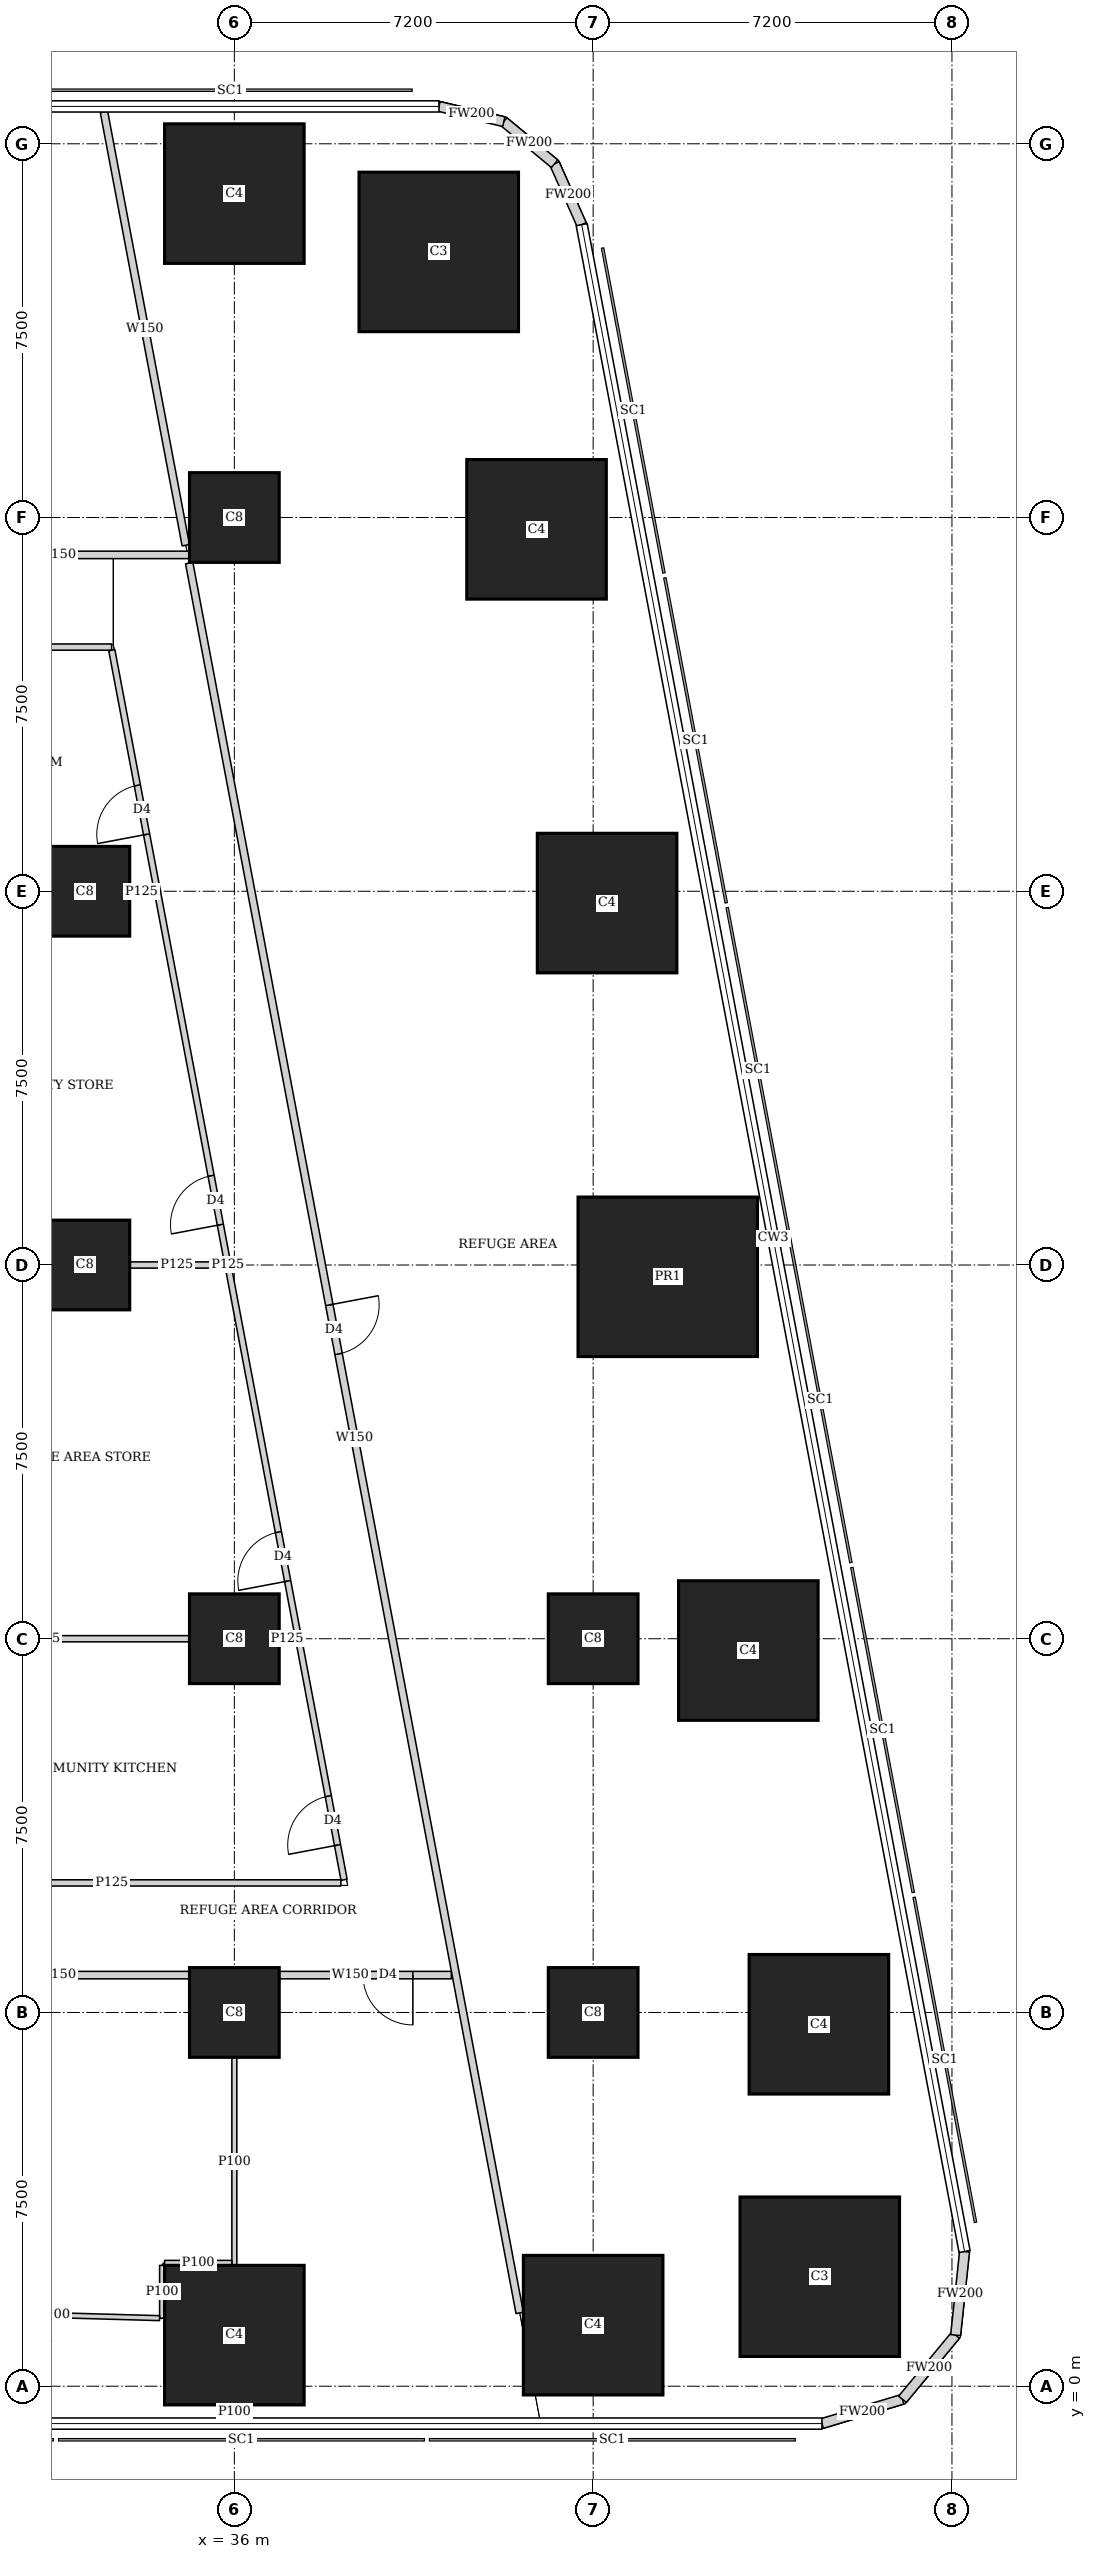
"""IFC4 building model, lengths in metres.
Left out: names, types, materials, properties, quantities, classifications, styles, units other than length and angle.
Written with IfcOpenShell. Run it as: python <this file> out.ifc"""

import sys

from ifc_helpers import new_model, si_unit, direction, frame, frame_2d, origin, origin_2d, place, context, subcontext, project, spatial, rectangle, extrude, element, fill, save


model = new_model("IFC4")
c1 = context("Model", 3, precision=1e-05, world=origin(), true_north=direction((0.0, 1.0)))
c2 = subcontext(c1, "Body", "Model", "MODEL_VIEW")
j1 = project(units=[si_unit("LENGTHUNIT", "METRE"), si_unit("PLANEANGLEUNIT", "RADIAN")], contexts=[c1])
p1 = place(None, origin())
s1 = spatial("IfcSite", under=j1, at=p1, CompositionType="ELEMENT")
p2 = place(p1, origin())
s2 = spatial("IfcBuilding", under=s1, at=p2, CompositionType="ELEMENT")
p3 = place(p2, frame((0.0, 0.0, 72.5)))
s3 = spatial("IfcBuildingStorey", under=s2, at=p3, CompositionType="ELEMENT", Elevation=72.5)
for number, where, z_axis, x_axis in (
    (1, (36.0, 1.025, 0.0), (0.0, 0.0, 1.0), (1.0, 0.0, 0.0)),
    (2, (43.2, 1.225, 0.0), (0.0, 0.0, 1.0), (1.0, 0.0, 0.0)),
):
    element("IfcColumn", number, at=place(p3, frame(where, z_axis=z_axis, x_axis=x_axis)), inside=s3, PredefinedType="COLUMN", context=c2, shape_type="SweptSolid", body=[
        extrude(rectangle(XDim=2.8, YDim=2.8, at=origin_2d()), origin(), (0.0, 0.0, 1.0), 5.4),
    ])
p4 = place(p3, frame((47.748, 2.197, 0.0), z_axis=(0.0, 0.0, 1.0), x_axis=(1.0, 0.0, 0.0)))
e3 = element("IfcColumn", 3, at=p4, inside=s3, PredefinedType="COLUMN", context=c2, shape_type="SweptSolid", body=[
    extrude(rectangle(XDim=3.2, YDim=3.2, at=origin_2d()), origin(), (0.0, 0.0, 1.0), 5.4),
])
for number, where, z_axis, x_axis in (
    (4, (36.0, 7.5, 0.0), (0.0, 0.0, 1.0), (1.0, 0.0, 0.0)),
    (5, (43.2, 7.5, 0.0), (0.0, 0.0, 1.0), (1.0, 0.0, 0.0)),
):
    element("IfcColumn", number, at=place(p3, frame(where, z_axis=z_axis, x_axis=x_axis)), inside=s3, PredefinedType="COLUMN", context=c2, shape_type="SweptSolid", body=[
        extrude(rectangle(XDim=1.8, YDim=1.8, at=origin_2d()), origin(), (0.0, 0.0, 1.0), 5.4),
    ])
p5 = place(p3, frame((47.73, 7.263, 0.0), z_axis=(0.0, 0.0, 1.0), x_axis=(1.0, 0.0, 0.0)))
e6 = element("IfcColumn", 6, at=p5, inside=s3, PredefinedType="COLUMN", context=c2, shape_type="SweptSolid", body=[
    extrude(rectangle(XDim=2.8, YDim=2.8, at=origin_2d()), origin(), (0.0, 0.0, 1.0), 5.4),
])
for number, where, z_axis, x_axis in (
    (7, (36.0, 15.0, 0.0), (0.0, 0.0, 1.0), (1.0, 0.0, 0.0)),
    (8, (43.2, 15.0, 0.0), (0.0, 0.0, 1.0), (1.0, 0.0, 0.0)),
):
    element("IfcColumn", number, at=place(p3, frame(where, z_axis=z_axis, x_axis=x_axis)), inside=s3, PredefinedType="COLUMN", context=c2, shape_type="SweptSolid", body=[
        extrude(rectangle(XDim=1.8, YDim=1.8, at=origin_2d()), origin(), (0.0, 0.0, 1.0), 5.4),
    ])
p6 = place(p3, frame((46.314, 14.763, 0.0), z_axis=(0.0, 0.0, 1.0), x_axis=(1.0, 0.0, 0.0)))
e9 = element("IfcColumn", 9, at=p6, inside=s3, PredefinedType="COLUMN", context=c2, shape_type="SweptSolid", body=[
    extrude(rectangle(XDim=2.8, YDim=2.8, at=origin_2d()), origin(), (0.0, 0.0, 1.0), 5.4),
])
p7 = place(p3, frame((33.0, 22.5, 0.0), z_axis=(0.0, 0.0, 1.0), x_axis=(1.0, 0.0, 0.0)))
e10 = element("IfcColumn", 10, at=p7, inside=s3, PredefinedType="COLUMN", context=c2, shape_type="SweptSolid", body=[
    extrude(rectangle(XDim=1.8, YDim=1.8, at=origin_2d()), origin(), (0.0, 0.0, 1.0), 5.4),
])
p8 = place(p3, frame((44.697, 22.263, 0.0), z_axis=(0.0, 0.0, 1.0), x_axis=(1.0, 0.0, 0.0)))
e11 = element("IfcColumn", 11, at=p8, inside=s3, PredefinedType="COLUMN", context=c2, shape_type="SweptSolid", body=[
    extrude(rectangle(XDim=3.6, YDim=3.2, at=origin_2d()), origin(), (0.0, 0.0, 1.0), 5.4),
])
p9 = place(p3, frame((33.0, 30.0, 0.0), z_axis=(0.0, 0.0, 1.0), x_axis=(1.0, 0.0, 0.0)))
e12 = element("IfcColumn", 12, at=p9, inside=s3, PredefinedType="COLUMN", context=c2, shape_type="SweptSolid", body=[
    extrude(rectangle(XDim=1.8, YDim=1.8, at=origin_2d()), origin(), (0.0, 0.0, 1.0), 5.4),
])
p10 = place(p3, frame((43.48, 29.763, 0.0), z_axis=(0.0, 0.0, 1.0), x_axis=(1.0, 0.0, 0.0)))
e13 = element("IfcColumn", 13, at=p10, inside=s3, PredefinedType="COLUMN", context=c2, shape_type="SweptSolid", body=[
    extrude(rectangle(XDim=2.8, YDim=2.8, at=origin_2d()), origin(), (0.0, 0.0, 1.0), 5.4),
])
p11 = place(p3, frame((36.0, 37.5, 0.0), z_axis=(0.0, 0.0, 1.0), x_axis=(1.0, 0.0, 0.0)))
e14 = element("IfcColumn", 14, at=p11, inside=s3, PredefinedType="COLUMN", context=c2, shape_type="SweptSolid", body=[
    extrude(rectangle(XDim=1.8, YDim=1.8, at=origin_2d()), origin(), (0.0, 0.0, 1.0), 5.4),
])
p12 = place(p3, frame((42.064, 37.263, 0.0), z_axis=(0.0, 0.0, 1.0), x_axis=(1.0, 0.0, 0.0)))
e15 = element("IfcColumn", 15, at=p12, inside=s3, PredefinedType="COLUMN", context=c2, shape_type="SweptSolid", body=[
    extrude(rectangle(XDim=2.8, YDim=2.8, at=origin_2d()), origin(), (0.0, 0.0, 1.0), 5.4),
])
p13 = place(p3, frame((40.102, 42.83, 0.0), z_axis=(0.0, 0.0, 1.0), x_axis=(1.0, 0.0, 0.0)))
e16 = element("IfcColumn", 16, at=p13, inside=s3, PredefinedType="COLUMN", context=c2, shape_type="SweptSolid", body=[
    extrude(rectangle(XDim=3.2, YDim=3.2, at=origin_2d()), origin(), (0.0, 0.0, 1.0), 5.4),
])
p14 = place(p3, frame((36.0, 44.0, 0.0), z_axis=(0.0, 0.0, 1.0), x_axis=(1.0, 0.0, 0.0)))
e17 = element("IfcColumn", 17, at=p14, inside=s3, PredefinedType="COLUMN", context=c2, shape_type="SweptSolid", body=[
    extrude(rectangle(XDim=2.8, YDim=2.8, at=origin_2d()), origin(), (0.0, 0.0, 1.0), 5.4),
])
p15 = place(p3, frame((47.791, -0.75, 0.0), z_axis=(0.0, 0.0, 1.0), x_axis=(0.957455232626, 0.288581838509, 0.0)))
e18 = element("IfcWall", 18, at=p15, inside=s3, PredefinedType="SOLIDWALL", context=c2, shape_type="SweptSolid", body=[
    extrude(rectangle(XDim=1.688, YDim=0.2, at=frame_2d((0.844, 0.0))), origin(), (0.0, 0.0, 1.0), 5.15),
])
p16 = place(p3, frame((49.407, -0.263, 0.0), z_axis=(0.0, 0.0, 1.0), x_axis=(0.638042593423, 0.770001070764, 0.0)))
e19 = element("IfcWall", 19, at=p16, inside=s3, PredefinedType="SOLIDWALL", context=c2, shape_type="SweptSolid", body=[
    extrude(rectangle(XDim=1.673, YDim=0.2, at=frame_2d((0.836, 0.0))), origin(), (0.0, 0.0, 1.0), 5.15),
])
p17 = place(p3, frame((50.474, 1.025, 0.0), z_axis=(0.0, 0.0, 1.0), x_axis=(0.106047815515, 0.994361031429, 0.0)))
e20 = element("IfcWall", 20, at=p17, inside=s3, PredefinedType="SOLIDWALL", context=c2, shape_type="SweptSolid", body=[
    extrude(rectangle(XDim=1.688, YDim=0.2, at=frame_2d((0.844, 0.0))), origin(), (0.0, 0.0, 1.0), 5.15),
])
p18 = place(p3, frame((42.97, 43.377, 0.0), z_axis=(0.0, 0.0, 1.0), x_axis=(-0.406002956633, 0.913871762998, 0.0)))
e21 = element("IfcWall", 21, at=p18, inside=s3, PredefinedType="SOLIDWALL", context=c2, shape_type="SweptSolid", body=[
    extrude(rectangle(XDim=1.337, YDim=0.2, at=frame_2d((0.669, 0.0))), origin(), (0.0, 0.0, 1.0), 5.15),
])
p19 = place(p3, frame((42.427, 44.599, 0.0), z_axis=(0.0, 0.0, 1.0), x_axis=(-0.770091412544, 0.637933551655, 0.0)))
e22 = element("IfcWall", 22, at=p19, inside=s3, PredefinedType="SOLIDWALL", context=c2, shape_type="SweptSolid", body=[
    extrude(rectangle(XDim=1.324, YDim=0.2, at=frame_2d((0.662, 0.0))), origin(), (0.0, 0.0, 1.0), 5.15),
])
p20 = place(p3, frame((41.407, 45.444, 0.0), z_axis=(0.0, 0.0, 1.0), x_axis=(-0.973453091607, 0.228886606077, 0.0)))
e23 = element("IfcWall", 23, at=p20, inside=s3, PredefinedType="SOLIDWALL", context=c2, shape_type="SweptSolid", body=[
    extrude(rectangle(XDim=1.336, YDim=0.2, at=frame_2d((0.668, 0.0))), origin(), (0.0, 0.0, 1.0), 5.15),
])
p21 = place(p3, frame((40.355, 8.25, 0.0), z_axis=(0.0, 0.0, 1.0), x_axis=(-1.0, 0.0, 0.0)))
e24 = element("IfcWall", 24, at=p21, inside=s3, PredefinedType="SOLIDWALL", context=c2, shape_type="SweptSolid", body=[
    extrude(rectangle(XDim=3.454, YDim=0.15, at=frame_2d((1.727, 0.0))), origin(), (0.0, 0.0, 1.0), 3.55),
])
p22 = place(p21, frame((0.773, 0.0, 0.0)))
e25 = element("IfcOpeningElement", 25, at=p22, cuts=e24, PredefinedType="OPENING", context=c2, shape_type="SweptSolid", body=[
    extrude(rectangle(XDim=1.0, YDim=2.1, at=frame_2d((0.5, 1.05))), frame((0.0, 0.085, 0.0), z_axis=(0.0, -1.0, 0.0), x_axis=(1.0, 0.0, 0.0)), (0.0, 0.0, 1.0), 0.17),
])
p23 = place(p3, frame((35.099, 8.25, 0.0), z_axis=(0.0, 0.0, 1.0), x_axis=(-1.0, 0.0, 0.0)))
e26 = element("IfcWall", 26, at=p23, inside=s3, PredefinedType="SOLIDWALL", context=c2, shape_type="SweptSolid", body=[
    extrude(rectangle(XDim=5.298, YDim=0.15, at=frame_2d((2.649, 0.0))), origin(), (0.0, 0.0, 1.0), 3.15),
])
p24 = place(p23, frame((3.148, 0.0, 0.0)))
e27 = element("IfcOpeningElement", 27, at=p24, cuts=e26, PredefinedType="OPENING", context=c2, shape_type="SweptSolid", body=[
    extrude(rectangle(XDim=2.0, YDim=2.1, at=frame_2d((1.0, 1.05))), frame((0.0, 0.085, 0.0), z_axis=(0.0, -1.0, 0.0), x_axis=(1.0, 0.0, 0.0)), (0.0, 0.0, 1.0), 0.17),
])
p25 = place(p3, frame((29.801, 36.75, 0.0), z_axis=(0.0, 0.0, 1.0), x_axis=(1.0, 0.0, 0.0)))
e28 = element("IfcWall", 28, at=p25, inside=s3, PredefinedType="SOLIDWALL", context=c2, shape_type="SweptSolid", body=[
    extrude(rectangle(XDim=5.299, YDim=0.15, at=frame_2d((2.649, 0.0))), origin(), (0.0, 0.0, 1.0), 3.15),
])
p26 = place(p3, frame((33.384, 45.638, 0.0), z_axis=(0.0, 0.0, 1.0), x_axis=(0.18557124981, -0.982630811263, 0.0)))
e29 = element("IfcWall", 29, at=p26, inside=s3, PredefinedType="SOLIDWALL", context=c2, shape_type="SweptSolid", body=[
    extrude(rectangle(XDim=8.847, YDim=0.15, at=frame_2d((4.424, 0.0))), origin(), (0.0, 0.0, 1.0), 3.35),
])
p27 = place(p3, frame((35.094, 36.585, 0.0), z_axis=(0.0, 0.0, 1.0), x_axis=(0.185591455861, -0.982626995106, 0.0)))
e30 = element("IfcWall", 30, at=p27, inside=s3, PredefinedType="SOLIDWALL", context=c2, shape_type="SweptSolid", body=[
    extrude(rectangle(XDim=35.735, YDim=0.15, at=frame_2d((17.867, 0.0))), origin(), (0.0, 0.0, 1.0), 3.35),
])
p28 = place(p27, frame((15.15, 0.0, 0.0)))
e31 = element("IfcOpeningElement", 31, at=p28, cuts=e30, PredefinedType="OPENING", context=c2, shape_type="SweptSolid", body=[
    extrude(rectangle(XDim=1.0, YDim=2.1, at=frame_2d((0.5, 1.05))), frame((0.0, 0.085, 0.0), z_axis=(0.0, -1.0, 0.0), x_axis=(1.0, 0.0, 0.0)), (0.0, 0.0, 1.0), 0.17),
])
p29 = place(p3, frame((36.0, -0.637, 0.0), z_axis=(0.0, 0.0, 1.0), x_axis=(0.0, 1.0, 0.0)))
e32 = element("IfcWall", 32, at=p29, inside=s3, PredefinedType="PARTITIONING", context=c2, shape_type="SweptSolid", body=[
    extrude(rectangle(XDim=0.261, YDim=0.1, at=frame_2d((0.13, 0.0))), origin(), (0.0, 0.0, 1.0), 5.15),
])
p30 = place(p3, frame((36.0, 2.426, 0.0), z_axis=(0.0, 0.0, 1.0), x_axis=(0.0, 1.0, 0.0)))
e33 = element("IfcWall", 33, at=p30, inside=s3, PredefinedType="PARTITIONING", context=c2, shape_type="SweptSolid", body=[
    extrude(rectangle(XDim=4.173, YDim=0.1, at=frame_2d((2.086, 0.0))), origin(), (0.0, 0.0, 1.0), 3.55),
])
p31 = place(p3, frame((28.95, 10.1, 0.0), z_axis=(0.0, 0.0, 1.0), x_axis=(1.0, 0.0, 0.0)))
e34 = element("IfcWall", 34, at=p31, inside=s3, PredefinedType="PARTITIONING", context=c2, shape_type="SweptSolid", body=[
    extrude(rectangle(XDim=9.188, YDim=0.125, at=frame_2d((4.594, 0.0))), origin(), (0.0, 0.0, 1.0), 3.15),
])
p32 = place(p3, frame((28.95, 34.9, 0.0), z_axis=(0.0, 0.0, 1.0), x_axis=(1.0, 0.0, 0.0)))
e35 = element("IfcWall", 35, at=p32, inside=s3, PredefinedType="PARTITIONING", context=c2, shape_type="SweptSolid", body=[
    extrude(rectangle(XDim=4.588, YDim=0.125, at=frame_2d((2.294, 0.0))), origin(), (0.0, 0.0, 1.0), 3.15),
])
p33 = place(p3, frame((38.202, 10.163, 0.0), z_axis=(0.0, 0.0, 1.0), x_axis=(-0.185610321132, 0.982623431783, 0.0)))
e36 = element("IfcWall", 36, at=p33, inside=s3, PredefinedType="PARTITIONING", context=c2, shape_type="SweptSolid", body=[
    extrude(rectangle(XDim=25.111, YDim=0.125, at=frame_2d((12.556, 0.0))), origin(), (0.0, 0.0, 1.0), 3.55),
])
p34 = place(p33, frame((0.708, 0.0, 0.0)))
e37 = element("IfcOpeningElement", 37, at=p34, cuts=e36, PredefinedType="OPENING", context=c2, shape_type="SweptSolid", body=[
    extrude(rectangle(XDim=1.0, YDim=2.1, at=frame_2d((0.5, 1.05))), frame((0.0, 0.073, 0.0), z_axis=(0.0, -1.0, 0.0), x_axis=(1.0, 0.0, 0.0)), (0.0, 0.0, 1.0), 0.145),
])
p35 = place(p33, frame((6.1, 0.0, 0.0)))
e38 = element("IfcOpeningElement", 38, at=p35, cuts=e36, PredefinedType="OPENING", context=c2, shape_type="SweptSolid", body=[
    extrude(rectangle(XDim=1.0, YDim=2.1, at=frame_2d((0.5, 1.05))), frame((0.0, 0.073, 0.0), z_axis=(0.0, -1.0, 0.0), x_axis=(1.0, 0.0, 0.0)), (0.0, 0.0, 1.0), 0.145),
])
p36 = place(p33, frame((13.378, 0.0, 0.0)))
e39 = element("IfcOpeningElement", 39, at=p36, cuts=e36, PredefinedType="OPENING", context=c2, shape_type="SweptSolid", body=[
    extrude(rectangle(XDim=1.0, YDim=2.1, at=frame_2d((0.5, 1.05))), frame((0.0, 0.073, 0.0), z_axis=(0.0, -1.0, 0.0), x_axis=(1.0, 0.0, 0.0)), (0.0, 0.0, 1.0), 0.145),
])
p37 = place(p33, frame((21.35, 0.0, 0.0)))
e40 = element("IfcOpeningElement", 40, at=p37, cuts=e36, PredefinedType="OPENING", context=c2, shape_type="SweptSolid", body=[
    extrude(rectangle(XDim=1.0, YDim=2.1, at=frame_2d((0.5, 1.05))), frame((0.0, 0.073, 0.0), z_axis=(0.0, -1.0, 0.0), x_axis=(1.0, 0.0, 0.0)), (0.0, 0.0, 1.0), 0.145),
])
p38 = place(p3, frame((29.25, 15.0, 0.0), z_axis=(0.0, 0.0, 1.0), x_axis=(1.0, 0.0, 0.0)))
e41 = element("IfcWall", 41, at=p38, inside=s3, PredefinedType="PARTITIONING", context=c2, shape_type="SweptSolid", body=[
    extrude(rectangle(XDim=5.849, YDim=0.125, at=frame_2d((2.925, 0.0))), origin(), (0.0, 0.0, 1.0), 3.55),
])
p39 = place(p3, frame((36.901, 15.0, 0.0), z_axis=(0.0, 0.0, 1.0), x_axis=(1.0, 0.0, 0.0)))
e42 = element("IfcWall", 42, at=p39, inside=s3, PredefinedType="PARTITIONING", context=c2, shape_type="SweptSolid", body=[
    extrude(rectangle(XDim=0.312, YDim=0.125, at=frame_2d((0.156, 0.0))), origin(), (0.0, 0.0, 1.0), 3.55),
])
p40 = place(p3, frame((33.901, 22.5, 0.0), z_axis=(0.0, 0.0, 1.0), x_axis=(1.0, 0.0, 0.0)))
e43 = element("IfcWall", 43, at=p40, inside=s3, PredefinedType="PARTITIONING", context=c2, shape_type="SweptSolid", body=[
    extrude(rectangle(XDim=1.895, YDim=0.125, at=frame_2d((0.948, 0.0))), origin(), (0.0, 0.0, 1.0), 3.55),
])
p41 = place(p3, frame((33.901, 30.0, 0.0), z_axis=(0.0, 0.0, 1.0), x_axis=(1.0, 0.0, 0.0)))
e44 = element("IfcWall", 44, at=p41, inside=s3, PredefinedType="PARTITIONING", context=c2, shape_type="SweptSolid", body=[
    extrude(rectangle(XDim=0.478, YDim=0.125, at=frame_2d((0.239, 0.0))), origin(), (0.0, 0.0, 1.0), 3.55),
])
p42 = place(p3, frame((35.95, 2.475, 0.0), z_axis=(0.0, 0.0, 1.0), x_axis=(-1.0, 0.0, 0.0)))
e45 = element("IfcWall", 45, at=p42, inside=s3, PredefinedType="PARTITIONING", context=c2, shape_type="SweptSolid", body=[
    extrude(rectangle(XDim=1.35, YDim=0.1, at=frame_2d((0.675, 0.0))), origin(), (0.0, 0.0, 1.0), 3.55),
])
p43 = place(p3, frame((34.55, 2.425, 0.0), z_axis=(0.0, 0.0, 1.0), x_axis=(0.0, -1.0, 0.0)))
e46 = element("IfcWall", 46, at=p43, inside=s3, PredefinedType="PARTITIONING", context=c2, shape_type="SweptSolid", body=[
    extrude(rectangle(XDim=1.06, YDim=0.1, at=frame_2d((0.53, 0.0))), origin(), (0.0, 0.0, 1.0), 3.35),
])
p44 = place(p3, frame((34.499, 1.366, 0.0), z_axis=(0.0, 0.0, 1.0), x_axis=(-0.999607123995, 0.028028515083, 0.0)))
e47 = element("IfcWall", 47, at=p44, inside=s3, PredefinedType="PARTITIONING", context=c2, shape_type="SweptSolid", body=[
    extrude(rectangle(XDim=4.251, YDim=0.1, at=frame_2d((2.125, 0.0))), origin(), (0.0, 0.0, 1.0), 3.35),
])
p45 = place(p22, origin())
e48 = element("IfcDoor", 48, at=p45, inside=s3, OperationType="SINGLE_SWING_LEFT", PredefinedType="DOOR", context=c2, shape_type="SweptSolid", body=[
    extrude(rectangle(XDim=1.0, YDim=2.1, at=frame_2d((0.5, 1.05))), frame((0.0, 0.025, 0.0), z_axis=(0.0, -1.0, 0.0), x_axis=(1.0, 0.0, 0.0)), (0.0, 0.0, 1.0), 0.05),
])
fill(e25, e48)
p46 = place(p28, origin())
e49 = element("IfcDoor", 49, at=p46, inside=s3, OperationType="SINGLE_SWING_LEFT", PredefinedType="DOOR", context=c2, shape_type="SweptSolid", body=[
    extrude(rectangle(XDim=1.0, YDim=2.1, at=frame_2d((0.5, 1.05))), frame((0.0, 0.025, 0.0), z_axis=(0.0, -1.0, 0.0), x_axis=(1.0, 0.0, 0.0)), (0.0, 0.0, 1.0), 0.05),
])
fill(e31, e49)
p47 = place(p34, origin())
e50 = element("IfcDoor", 50, at=p47, inside=s3, OperationType="SINGLE_SWING_LEFT", PredefinedType="DOOR", context=c2, shape_type="SweptSolid", body=[
    extrude(rectangle(XDim=1.0, YDim=2.1, at=frame_2d((0.5, 1.05))), frame((0.0, 0.025, 0.0), z_axis=(0.0, -1.0, 0.0), x_axis=(1.0, 0.0, 0.0)), (0.0, 0.0, 1.0), 0.05),
])
fill(e37, e50)
p48 = place(p35, origin())
e51 = element("IfcDoor", 51, at=p48, inside=s3, OperationType="SINGLE_SWING_LEFT", PredefinedType="DOOR", context=c2, shape_type="SweptSolid", body=[
    extrude(rectangle(XDim=1.0, YDim=2.1, at=frame_2d((0.5, 1.05))), frame((0.0, 0.025, 0.0), z_axis=(0.0, -1.0, 0.0), x_axis=(1.0, 0.0, 0.0)), (0.0, 0.0, 1.0), 0.05),
])
fill(e38, e51)
p49 = place(p36, origin())
e52 = element("IfcDoor", 52, at=p49, inside=s3, OperationType="SINGLE_SWING_LEFT", PredefinedType="DOOR", context=c2, shape_type="SweptSolid", body=[
    extrude(rectangle(XDim=1.0, YDim=2.1, at=frame_2d((0.5, 1.05))), frame((0.0, 0.025, 0.0), z_axis=(0.0, -1.0, 0.0), x_axis=(1.0, 0.0, 0.0)), (0.0, 0.0, 1.0), 0.05),
])
fill(e39, e52)
p50 = place(p37, origin())
e53 = element("IfcDoor", 53, at=p50, inside=s3, OperationType="SINGLE_SWING_LEFT", PredefinedType="DOOR", context=c2, shape_type="SweptSolid", body=[
    extrude(rectangle(XDim=1.0, YDim=2.1, at=frame_2d((0.5, 1.05))), frame((0.0, 0.025, 0.0), z_axis=(0.0, -1.0, 0.0), x_axis=(1.0, 0.0, 0.0)), (0.0, 0.0, 1.0), 0.05),
])
fill(e40, e53)
save(model, sys.argv[1])
